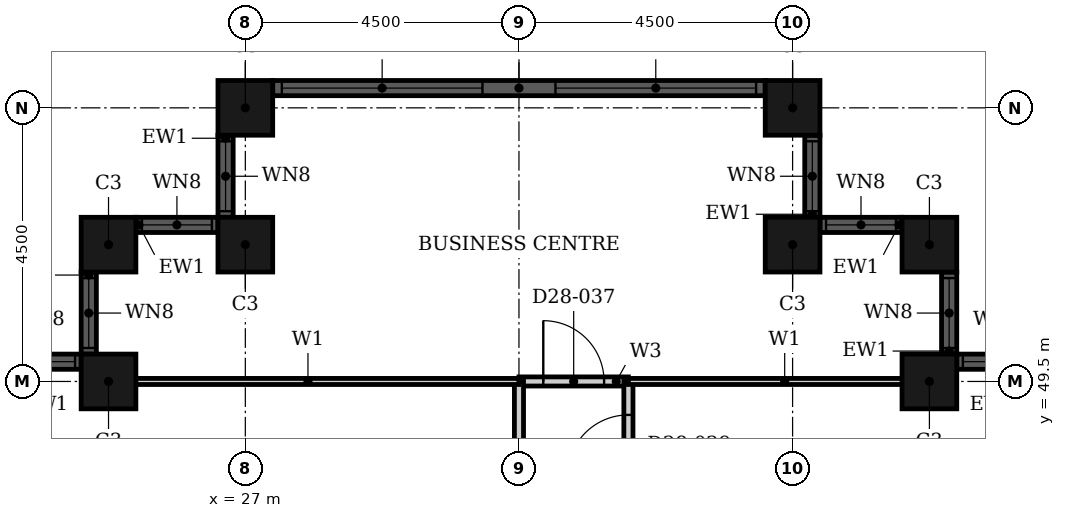
"""IFC4 building model, lengths in metres.
Left out: names, types, materials, properties, quantities, classifications, styles, units other than length and angle.
Written with IfcOpenShell. Run it as: python <this file> out.ifc"""

import sys

from ifc_helpers import new_model, si_unit, direction, frame, frame_2d, origin, origin_2d, place, context, subcontext, project, spatial, rectangle, hollow_rectangle, extrude, element, fill, save


model = new_model("IFC4")
c1 = context("Model", 3, precision=1e-05, world=origin(), true_north=direction((0.0, 1.0)))
c2 = subcontext(c1, "Body", "Model", "MODEL_VIEW")
j1 = project(units=[si_unit("LENGTHUNIT", "METRE"), si_unit("PLANEANGLEUNIT", "RADIAN")], contexts=[c1])
p1 = place(None, origin())
s1 = spatial("IfcSite", under=j1, at=p1, CompositionType="ELEMENT")
p2 = place(p1, origin())
s2 = spatial("IfcBuilding", under=s1, at=p2, CompositionType="ELEMENT")
p3 = place(p2, frame((0.0, 0.0, 115.2)))
s3 = spatial("IfcBuildingStorey", under=s2, at=p3, CompositionType="ELEMENT", Elevation=115.2)
for number, where, z_axis, x_axis in (
    (1, (38.25, 49.5, 0.0), (0.0, 0.0, 1.0), (1.0, 0.0, 0.0)),
    (2, (38.25, 51.75, 0.0), (0.0, 0.0, 1.0), (1.0, 0.0, 0.0)),
    (3, (36.0, 51.75, 0.0), (0.0, 0.0, 1.0), (1.0, 0.0, 0.0)),
    (4, (36.0, 54.0, 0.0), (0.0, 0.0, 1.0), (1.0, 0.0, 0.0)),
    (5, (27.0, 54.0, 0.0), (0.0, 0.0, 1.0), (1.0, 0.0, 0.0)),
    (6, (27.0, 51.75, 0.0), (0.0, 0.0, 1.0), (1.0, 0.0, 0.0)),
    (7, (24.75, 51.75, 0.0), (0.0, 0.0, 1.0), (1.0, 0.0, 0.0)),
    (8, (24.75, 49.5, 0.0), (0.0, 0.0, 1.0), (1.0, 0.0, 0.0)),
):
    element("IfcColumn", number, at=place(p3, frame(where, z_axis=z_axis, x_axis=x_axis)), inside=s3, PredefinedType="COLUMN", context=c2, shape_type="SweptSolid", body=[
        extrude(hollow_rectangle(XDim=0.9, YDim=0.9, WallThickness=0.028, at=origin_2d()), origin(), (0.0, 0.0, 1.0), 3.6),
    ])
p4 = place(p3, frame((40.05, 49.825, 0.0), z_axis=(0.0, 0.0, 1.0), x_axis=(-1.0, 0.0, 0.0)))
e9 = element("IfcWall", 9, at=p4, inside=s3, PredefinedType="SOLIDWALL", context=c2, shape_type="SweptSolid", body=[
    extrude(rectangle(XDim=1.35, YDim=0.25, at=frame_2d((0.675, 0.0))), origin(), (0.0, 0.0, 1.0), 3.6),
])
p5 = place(p4, frame((0.1, 0.0, 0.9)))
e10 = element("IfcOpeningElement", 10, at=p5, cuts=e9, PredefinedType="OPENING", context=c2, shape_type="SweptSolid", body=[
    extrude(rectangle(XDim=1.15, YDim=2.08, at=frame_2d((0.575, 1.04))), frame((0.0, 0.135, 0.0), z_axis=(0.0, -1.0, 0.0), x_axis=(1.0, 0.0, 0.0)), (0.0, 0.0, 1.0), 0.27),
])
p6 = place(p3, frame((38.575, 49.95, 0.0), z_axis=(0.0, 0.0, 1.0), x_axis=(0.0, 1.0, 0.0)))
e11 = element("IfcWall", 11, at=p6, inside=s3, PredefinedType="SOLIDWALL", context=c2, shape_type="SweptSolid", body=[
    extrude(rectangle(XDim=1.35, YDim=0.25, at=frame_2d((0.675, 0.0))), origin(), (0.0, 0.0, 1.0), 3.6),
])
p7 = place(p6, frame((0.1, 0.0, 0.9)))
e12 = element("IfcOpeningElement", 12, at=p7, cuts=e11, PredefinedType="OPENING", context=c2, shape_type="SweptSolid", body=[
    extrude(rectangle(XDim=1.15, YDim=2.08, at=frame_2d((0.575, 1.04))), frame((0.0, 0.135, 0.0), z_axis=(0.0, -1.0, 0.0), x_axis=(1.0, 0.0, 0.0)), (0.0, 0.0, 1.0), 0.27),
])
p8 = place(p3, frame((37.8, 52.075, 0.0), z_axis=(0.0, 0.0, 1.0), x_axis=(-1.0, 0.0, 0.0)))
e13 = element("IfcWall", 13, at=p8, inside=s3, PredefinedType="SOLIDWALL", context=c2, shape_type="SweptSolid", body=[
    extrude(rectangle(XDim=1.35, YDim=0.25, at=frame_2d((0.675, 0.0))), origin(), (0.0, 0.0, 1.0), 3.6),
])
p9 = place(p8, frame((0.1, 0.0, 0.9)))
e14 = element("IfcOpeningElement", 14, at=p9, cuts=e13, PredefinedType="OPENING", context=c2, shape_type="SweptSolid", body=[
    extrude(rectangle(XDim=1.15, YDim=2.08, at=frame_2d((0.575, 1.04))), frame((0.0, 0.135, 0.0), z_axis=(0.0, -1.0, 0.0), x_axis=(1.0, 0.0, 0.0)), (0.0, 0.0, 1.0), 0.27),
])
p10 = place(p3, frame((36.325, 52.2, 0.0), z_axis=(0.0, 0.0, 1.0), x_axis=(0.0, 1.0, 0.0)))
e15 = element("IfcWall", 15, at=p10, inside=s3, PredefinedType="SOLIDWALL", context=c2, shape_type="SweptSolid", body=[
    extrude(rectangle(XDim=1.35, YDim=0.25, at=frame_2d((0.675, 0.0))), origin(), (0.0, 0.0, 1.0), 3.6),
])
p11 = place(p10, frame((0.1, 0.0, 0.9)))
e16 = element("IfcOpeningElement", 16, at=p11, cuts=e15, PredefinedType="OPENING", context=c2, shape_type="SweptSolid", body=[
    extrude(rectangle(XDim=1.15, YDim=2.08, at=frame_2d((0.575, 1.04))), frame((0.0, 0.135, 0.0), z_axis=(0.0, -1.0, 0.0), x_axis=(1.0, 0.0, 0.0)), (0.0, 0.0, 1.0), 0.27),
])
p12 = place(p3, frame((35.55, 54.325, 0.0), z_axis=(0.0, 0.0, 1.0), x_axis=(-1.0, 0.0, 0.0)))
e17 = element("IfcWall", 17, at=p12, inside=s3, PredefinedType="SOLIDWALL", context=c2, shape_type="SweptSolid", body=[
    extrude(rectangle(XDim=8.1, YDim=0.25, at=frame_2d((4.05, 0.0))), origin(), (0.0, 0.0, 1.0), 3.6),
])
p13 = place(p12, frame((0.15, 0.0, 0.9)))
e18 = element("IfcOpeningElement", 18, at=p13, cuts=e17, PredefinedType="OPENING", context=c2, shape_type="SweptSolid", body=[
    extrude(rectangle(XDim=3.3, YDim=2.08, at=frame_2d((1.65, 1.04))), frame((0.0, 0.135, 0.0), z_axis=(0.0, -1.0, 0.0), x_axis=(1.0, 0.0, 0.0)), (0.0, 0.0, 1.0), 0.27),
])
p14 = place(p12, frame((4.65, 0.0, 0.9)))
e19 = element("IfcOpeningElement", 19, at=p14, cuts=e17, PredefinedType="OPENING", context=c2, shape_type="SweptSolid", body=[
    extrude(rectangle(XDim=3.3, YDim=2.08, at=frame_2d((1.65, 1.04))), frame((0.0, 0.135, 0.0), z_axis=(0.0, -1.0, 0.0), x_axis=(1.0, 0.0, 0.0)), (0.0, 0.0, 1.0), 0.27),
])
p15 = place(p3, frame((26.675, 53.55, 0.0), z_axis=(0.0, 0.0, 1.0), x_axis=(0.0, -1.0, 0.0)))
e20 = element("IfcWall", 20, at=p15, inside=s3, PredefinedType="SOLIDWALL", context=c2, shape_type="SweptSolid", body=[
    extrude(rectangle(XDim=1.35, YDim=0.25, at=frame_2d((0.675, 0.0))), origin(), (0.0, 0.0, 1.0), 3.6),
])
p16 = place(p15, frame((0.1, 0.0, 0.9)))
e21 = element("IfcOpeningElement", 21, at=p16, cuts=e20, PredefinedType="OPENING", context=c2, shape_type="SweptSolid", body=[
    extrude(rectangle(XDim=1.15, YDim=2.08, at=frame_2d((0.575, 1.04))), frame((0.0, 0.135, 0.0), z_axis=(0.0, -1.0, 0.0), x_axis=(1.0, 0.0, 0.0)), (0.0, 0.0, 1.0), 0.27),
])
p17 = place(p3, frame((26.55, 52.075, 0.0), z_axis=(0.0, 0.0, 1.0), x_axis=(-1.0, 0.0, 0.0)))
e22 = element("IfcWall", 22, at=p17, inside=s3, PredefinedType="SOLIDWALL", context=c2, shape_type="SweptSolid", body=[
    extrude(rectangle(XDim=1.35, YDim=0.25, at=frame_2d((0.675, 0.0))), origin(), (0.0, 0.0, 1.0), 3.6),
])
p18 = place(p17, frame((0.1, 0.0, 0.9)))
e23 = element("IfcOpeningElement", 23, at=p18, cuts=e22, PredefinedType="OPENING", context=c2, shape_type="SweptSolid", body=[
    extrude(rectangle(XDim=1.15, YDim=2.08, at=frame_2d((0.575, 1.04))), frame((0.0, 0.135, 0.0), z_axis=(0.0, -1.0, 0.0), x_axis=(1.0, 0.0, 0.0)), (0.0, 0.0, 1.0), 0.27),
])
p19 = place(p3, frame((24.425, 51.3, 0.0), z_axis=(0.0, 0.0, 1.0), x_axis=(0.0, -1.0, 0.0)))
e24 = element("IfcWall", 24, at=p19, inside=s3, PredefinedType="SOLIDWALL", context=c2, shape_type="SweptSolid", body=[
    extrude(rectangle(XDim=1.35, YDim=0.25, at=frame_2d((0.675, 0.0))), origin(), (0.0, 0.0, 1.0), 3.6),
])
p20 = place(p19, frame((0.1, 0.0, 0.9)))
e25 = element("IfcOpeningElement", 25, at=p20, cuts=e24, PredefinedType="OPENING", context=c2, shape_type="SweptSolid", body=[
    extrude(rectangle(XDim=1.15, YDim=2.08, at=frame_2d((0.575, 1.04))), frame((0.0, 0.135, 0.0), z_axis=(0.0, -1.0, 0.0), x_axis=(1.0, 0.0, 0.0)), (0.0, 0.0, 1.0), 0.27),
])
p21 = place(p3, frame((24.3, 49.825, 0.0), z_axis=(0.0, 0.0, 1.0), x_axis=(-1.0, 0.0, 0.0)))
e26 = element("IfcWall", 26, at=p21, inside=s3, PredefinedType="SOLIDWALL", context=c2, shape_type="SweptSolid", body=[
    extrude(rectangle(XDim=1.35, YDim=0.25, at=frame_2d((0.675, 0.0))), origin(), (0.0, 0.0, 1.0), 3.6),
])
p22 = place(p21, frame((0.1, 0.0, 0.9)))
e27 = element("IfcOpeningElement", 27, at=p22, cuts=e26, PredefinedType="OPENING", context=c2, shape_type="SweptSolid", body=[
    extrude(rectangle(XDim=1.15, YDim=2.08, at=frame_2d((0.575, 1.04))), frame((0.0, 0.135, 0.0), z_axis=(0.0, -1.0, 0.0), x_axis=(1.0, 0.0, 0.0)), (0.0, 0.0, 1.0), 0.27),
])
p23 = place(p3, frame((31.5, 49.5, 0.0), z_axis=(0.0, 0.0, 1.0), x_axis=(1.0, 0.0, 0.0)))
e28 = element("IfcWall", 28, at=p23, inside=s3, PredefinedType="PARTITIONING", context=c2, shape_type="SweptSolid", body=[
    extrude(rectangle(XDim=1.8, YDim=0.15, at=frame_2d((0.9, 0.0))), origin(), (0.0, 0.0, 1.0), 3.3),
])
p24 = place(p23, frame((0.4, 0.0, 0.0)))
e29 = element("IfcOpeningElement", 29, at=p24, cuts=e28, PredefinedType="OPENING", context=c2, shape_type="SweptSolid", body=[
    extrude(rectangle(XDim=1.0, YDim=2.1, at=frame_2d((0.5, 1.05))), frame((0.0, 0.085, 0.0), z_axis=(0.0, -1.0, 0.0), x_axis=(1.0, 0.0, 0.0)), (0.0, 0.0, 1.0), 0.17),
])
p25 = place(p3, frame((31.5, 33.3, 0.0), z_axis=(0.0, 0.0, 1.0), x_axis=(0.0, 1.0, 0.0)))
e30 = element("IfcWall", 30, at=p25, inside=s3, PredefinedType="PARTITIONING", context=c2, shape_type="SweptSolid", body=[
    extrude(rectangle(XDim=16.2, YDim=0.15, at=frame_2d((8.1, 0.0))), origin(), (0.0, 0.0, 1.0), 2.58),
])
p26 = place(p25, frame((8.95, 0.0, 0.0)))
e31 = element("IfcOpeningElement", 31, at=p26, cuts=e30, PredefinedType="OPENING", context=c2, shape_type="SweptSolid", body=[
    extrude(rectangle(XDim=1.0, YDim=2.1, at=frame_2d((0.5, 1.05))), frame((0.0, 0.085, 0.0), z_axis=(0.0, -1.0, 0.0), x_axis=(1.0, 0.0, 0.0)), (0.0, 0.0, 1.0), 0.17),
])
p27 = place(p3, frame((33.3, 33.3, 0.0), z_axis=(0.0, 0.0, 1.0), x_axis=(0.0, 1.0, 0.0)))
e32 = element("IfcWall", 32, at=p27, inside=s3, PredefinedType="PARTITIONING", context=c2, shape_type="SweptSolid", body=[
    extrude(rectangle(XDim=16.2, YDim=0.15, at=frame_2d((8.1, 0.0))), origin(), (0.0, 0.0, 1.0), 3.3),
])
p28 = place(p27, frame((10.15, 0.0, 0.0)))
e33 = element("IfcOpeningElement", 33, at=p28, cuts=e32, PredefinedType="OPENING", context=c2, shape_type="SweptSolid", body=[
    extrude(rectangle(XDim=1.0, YDim=2.1, at=frame_2d((0.5, 1.05))), frame((0.0, 0.085, 0.0), z_axis=(0.0, -1.0, 0.0), x_axis=(1.0, 0.0, 0.0)), (0.0, 0.0, 1.0), 0.17),
])
p29 = place(p27, frame((14.65, 0.0, 0.0)))
e34 = element("IfcOpeningElement", 34, at=p29, cuts=e32, PredefinedType="OPENING", context=c2, shape_type="SweptSolid", body=[
    extrude(rectangle(XDim=1.0, YDim=2.1, at=frame_2d((0.5, 1.05))), frame((0.0, 0.085, 0.0), z_axis=(0.0, -1.0, 0.0), x_axis=(1.0, 0.0, 0.0)), (0.0, 0.0, 1.0), 0.17),
])
p30 = place(p3, frame((33.3, 49.5, 0.0), z_axis=(0.0, 0.0, 1.0), x_axis=(1.0, 0.0, 0.0)))
e35 = element("IfcWall", 35, at=p30, inside=s3, PredefinedType="PARTITIONING", context=c2, shape_type="SweptSolid", body=[
    extrude(rectangle(XDim=5.14, YDim=0.1, at=frame_2d((2.57, 0.0))), origin(), (0.0, 0.0, 1.0), 3.3),
])
p31 = place(p3, frame((24.56, 49.5, 0.0), z_axis=(0.0, 0.0, 1.0), x_axis=(1.0, 0.0, 0.0)))
e36 = element("IfcWall", 36, at=p31, inside=s3, PredefinedType="PARTITIONING", context=c2, shape_type="SweptSolid", body=[
    extrude(rectangle(XDim=6.94, YDim=0.1, at=frame_2d((3.47, 0.0))), origin(), (0.0, 0.0, 1.0), 3.3),
])
p32 = place(p5, origin())
e37 = element("IfcWindow", 37, at=p32, inside=s3, PartitioningType="SINGLE_PANEL", PredefinedType="WINDOW", context=c2, shape_type="SweptSolid", body=[
    extrude(rectangle(XDim=1.15, YDim=2.08, at=frame_2d((0.575, 1.04))), frame((0.0, 0.03, 0.0), z_axis=(0.0, -1.0, 0.0), x_axis=(1.0, 0.0, 0.0)), (0.0, 0.0, 1.0), 0.06),
])
fill(e10, e37)
p33 = place(p7, origin())
e38 = element("IfcWindow", 38, at=p33, inside=s3, PartitioningType="SINGLE_PANEL", PredefinedType="WINDOW", context=c2, shape_type="SweptSolid", body=[
    extrude(rectangle(XDim=1.15, YDim=2.08, at=frame_2d((0.575, 1.04))), frame((0.0, 0.03, 0.0), z_axis=(0.0, -1.0, 0.0), x_axis=(1.0, 0.0, 0.0)), (0.0, 0.0, 1.0), 0.06),
])
fill(e12, e38)
p34 = place(p9, origin())
e39 = element("IfcWindow", 39, at=p34, inside=s3, PartitioningType="SINGLE_PANEL", PredefinedType="WINDOW", context=c2, shape_type="SweptSolid", body=[
    extrude(rectangle(XDim=1.15, YDim=2.08, at=frame_2d((0.575, 1.04))), frame((0.0, 0.03, 0.0), z_axis=(0.0, -1.0, 0.0), x_axis=(1.0, 0.0, 0.0)), (0.0, 0.0, 1.0), 0.06),
])
fill(e14, e39)
p35 = place(p11, origin())
e40 = element("IfcWindow", 40, at=p35, inside=s3, PartitioningType="SINGLE_PANEL", PredefinedType="WINDOW", context=c2, shape_type="SweptSolid", body=[
    extrude(rectangle(XDim=1.15, YDim=2.08, at=frame_2d((0.575, 1.04))), frame((0.0, 0.03, 0.0), z_axis=(0.0, -1.0, 0.0), x_axis=(1.0, 0.0, 0.0)), (0.0, 0.0, 1.0), 0.06),
])
fill(e16, e40)
p36 = place(p13, origin())
e41 = element("IfcWindow", 41, at=p36, inside=s3, PartitioningType="SINGLE_PANEL", PredefinedType="WINDOW", context=c2, shape_type="SweptSolid", body=[
    extrude(rectangle(XDim=3.3, YDim=2.08, at=frame_2d((1.65, 1.04))), frame((0.0, 0.03, 0.0), z_axis=(0.0, -1.0, 0.0), x_axis=(1.0, 0.0, 0.0)), (0.0, 0.0, 1.0), 0.06),
])
fill(e18, e41)
p37 = place(p14, origin())
e42 = element("IfcWindow", 42, at=p37, inside=s3, PartitioningType="SINGLE_PANEL", PredefinedType="WINDOW", context=c2, shape_type="SweptSolid", body=[
    extrude(rectangle(XDim=3.3, YDim=2.08, at=frame_2d((1.65, 1.04))), frame((0.0, 0.03, 0.0), z_axis=(0.0, -1.0, 0.0), x_axis=(1.0, 0.0, 0.0)), (0.0, 0.0, 1.0), 0.06),
])
fill(e19, e42)
p38 = place(p16, origin())
e43 = element("IfcWindow", 43, at=p38, inside=s3, PartitioningType="SINGLE_PANEL", PredefinedType="WINDOW", context=c2, shape_type="SweptSolid", body=[
    extrude(rectangle(XDim=1.15, YDim=2.08, at=frame_2d((0.575, 1.04))), frame((0.0, 0.03, 0.0), z_axis=(0.0, -1.0, 0.0), x_axis=(1.0, 0.0, 0.0)), (0.0, 0.0, 1.0), 0.06),
])
fill(e21, e43)
p39 = place(p18, origin())
e44 = element("IfcWindow", 44, at=p39, inside=s3, PartitioningType="SINGLE_PANEL", PredefinedType="WINDOW", context=c2, shape_type="SweptSolid", body=[
    extrude(rectangle(XDim=1.15, YDim=2.08, at=frame_2d((0.575, 1.04))), frame((0.0, 0.03, 0.0), z_axis=(0.0, -1.0, 0.0), x_axis=(1.0, 0.0, 0.0)), (0.0, 0.0, 1.0), 0.06),
])
fill(e23, e44)
p40 = place(p20, origin())
e45 = element("IfcWindow", 45, at=p40, inside=s3, PartitioningType="SINGLE_PANEL", PredefinedType="WINDOW", context=c2, shape_type="SweptSolid", body=[
    extrude(rectangle(XDim=1.15, YDim=2.08, at=frame_2d((0.575, 1.04))), frame((0.0, 0.03, 0.0), z_axis=(0.0, -1.0, 0.0), x_axis=(1.0, 0.0, 0.0)), (0.0, 0.0, 1.0), 0.06),
])
fill(e25, e45)
p41 = place(p22, origin())
e46 = element("IfcWindow", 46, at=p41, inside=s3, PartitioningType="SINGLE_PANEL", PredefinedType="WINDOW", context=c2, shape_type="SweptSolid", body=[
    extrude(rectangle(XDim=1.15, YDim=2.08, at=frame_2d((0.575, 1.04))), frame((0.0, 0.03, 0.0), z_axis=(0.0, -1.0, 0.0), x_axis=(1.0, 0.0, 0.0)), (0.0, 0.0, 1.0), 0.06),
])
fill(e27, e46)
p42 = place(p29, origin())
e47 = element("IfcDoor", 47, at=p42, inside=s3, OperationType="SINGLE_SWING_RIGHT", PredefinedType="DOOR", context=c2, shape_type="SweptSolid", body=[
    extrude(rectangle(XDim=1.0, YDim=2.1, at=frame_2d((0.5, 1.05))), frame((0.0, 0.025, 0.0), z_axis=(0.0, -1.0, 0.0), x_axis=(1.0, 0.0, 0.0)), (0.0, 0.0, 1.0), 0.05),
])
fill(e34, e47)
p43 = place(p24, origin())
e48 = element("IfcDoor", 48, at=p43, inside=s3, OperationType="SINGLE_SWING_RIGHT", PredefinedType="DOOR", context=c2, shape_type="SweptSolid", body=[
    extrude(rectangle(XDim=1.0, YDim=2.1, at=frame_2d((0.5, 1.05))), frame((0.0, 0.025, 0.0), z_axis=(0.0, -1.0, 0.0), x_axis=(1.0, 0.0, 0.0)), (0.0, 0.0, 1.0), 0.05),
])
fill(e29, e48)
save(model, sys.argv[1])
